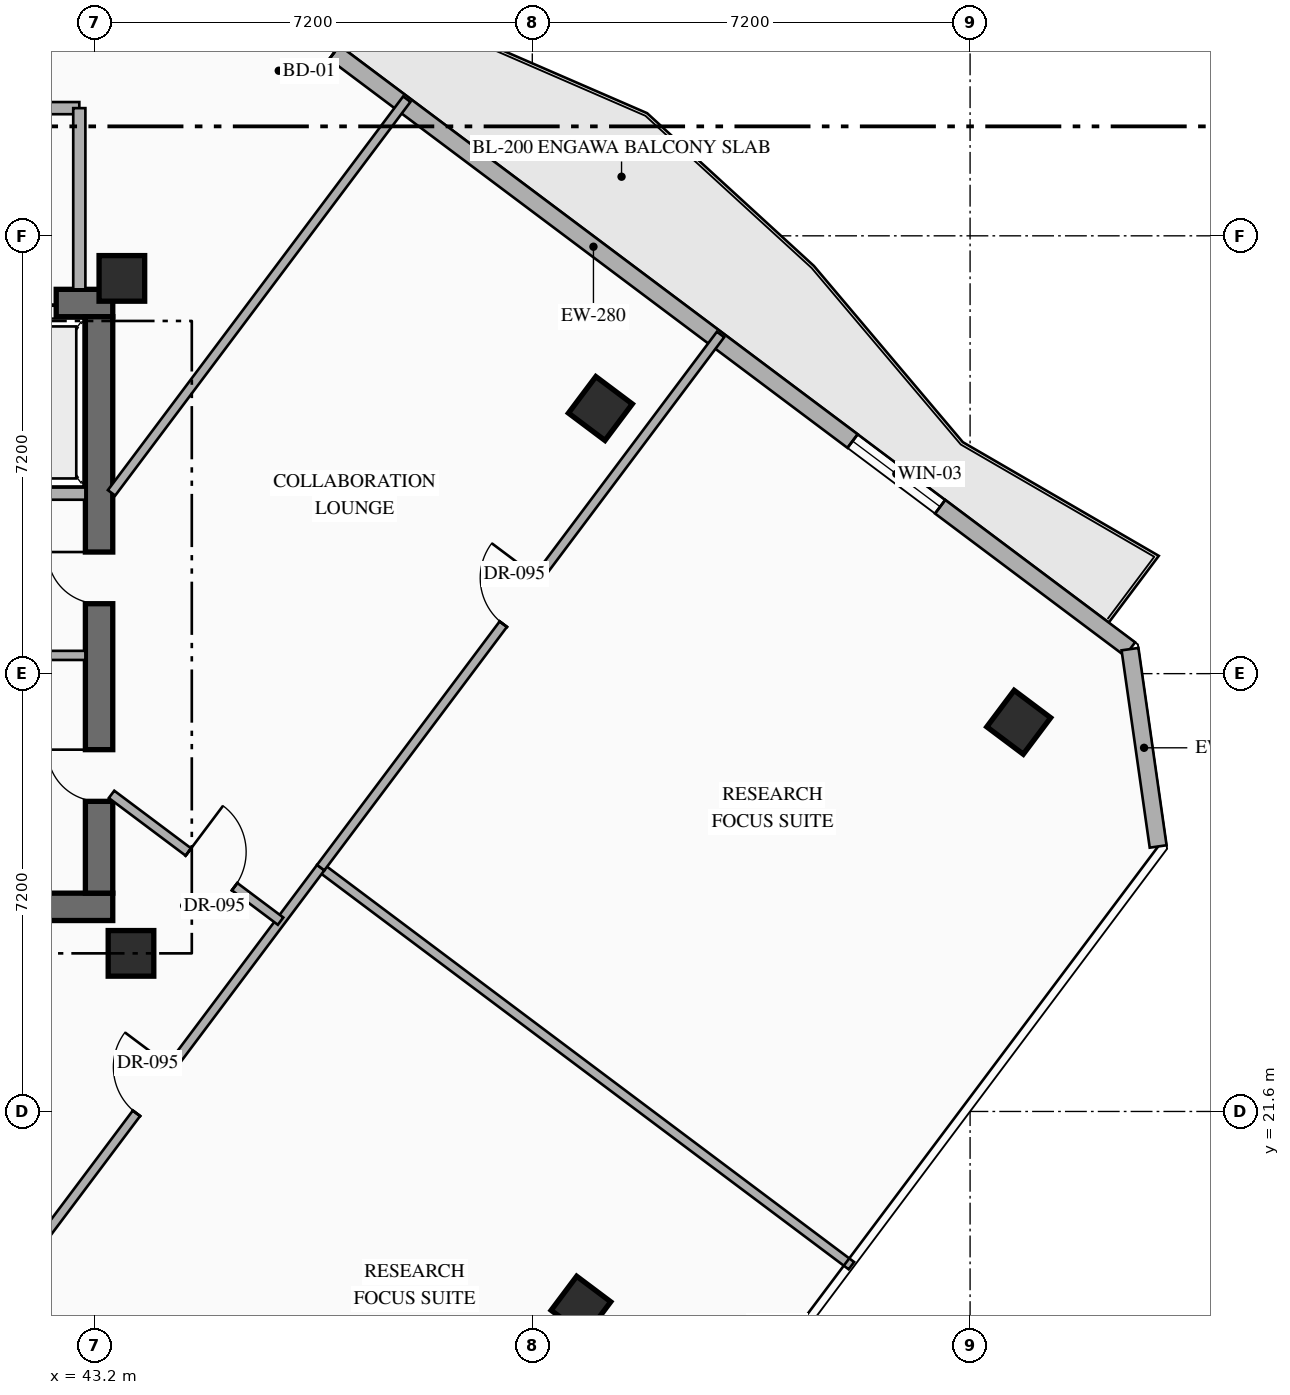
"""IFC4 building model, lengths in metres.
Left out: names, types, materials, properties, quantities, classifications, styles, units other than length and angle.
Written with IfcOpenShell. Run it as: python <this file> out.ifc"""

import sys

from ifc_helpers import new_model, si_unit, direction, frame, frame_2d, origin, origin_2d, place, context, subcontext, project, spatial, rectangle, hollow_rectangle, extrude, element, fill, save


model = new_model("IFC4")
c1 = context("Model", 3, precision=1e-05, world=origin(), true_north=direction((0.0, 1.0)))
c2 = subcontext(c1, "Body", "Model", "MODEL_VIEW")
j1 = project(units=[si_unit("LENGTHUNIT", "METRE"), si_unit("PLANEANGLEUNIT", "RADIAN")], contexts=[c1])
p1 = place(None, origin())
s1 = spatial("IfcSite", under=j1, at=p1, CompositionType="ELEMENT")
p2 = place(p1, origin())
s2 = spatial("IfcBuilding", under=s1, at=p2, CompositionType="ELEMENT")
p3 = place(p2, frame((0.0, 0.0, 186.75)))
s3 = spatial("IfcBuildingStorey", under=s2, at=p3, CompositionType="ELEMENT", Elevation=186.75)
p4 = place(p3, frame((36.04, 24.965, 0.0), z_axis=(0.0, 0.0, 1.0), x_axis=(1.0, 0.0, 0.0)))
e1 = element("IfcWall", 1, at=p4, inside=s3, PredefinedType="SHEAR", context=c2, shape_type="SweptSolid", body=[
    extrude(rectangle(XDim=7.46, YDim=0.45, at=frame_2d((3.73, 0.0))), origin(), (0.0, 0.0, 1.0), 4.8),
])
p5 = place(p3, frame((36.04, 34.895, 0.0), z_axis=(0.0, 0.0, 1.0), x_axis=(1.0, 0.0, 0.0)))
e2 = element("IfcWall", 2, at=p5, inside=s3, PredefinedType="SHEAR", context=c2, shape_type="SweptSolid", body=[
    extrude(rectangle(XDim=7.46, YDim=0.45, at=frame_2d((3.73, 0.0))), origin(), (0.0, 0.0, 1.0), 4.8),
])
p6 = place(p5, frame((2.51, 0.0, 0.0)))
e3 = element("IfcOpeningElement", 3, at=p6, cuts=e2, PredefinedType="OPENING", context=c2, shape_type="SweptSolid", body=[
    extrude(rectangle(XDim=1.1, YDim=2.2, at=frame_2d((0.55, 1.1))), frame((0.0, 0.235, 0.0), z_axis=(0.0, -1.0, 0.0), x_axis=(1.0, 0.0, 0.0)), (0.0, 0.0, 1.0), 0.47),
])
p7 = place(p5, frame((5.41, 0.0, 0.0)))
e4 = element("IfcOpeningElement", 4, at=p7, cuts=e2, PredefinedType="OPENING", context=c2, shape_type="SweptSolid", body=[
    extrude(rectangle(XDim=1.12, YDim=2.15, at=frame_2d((0.56, 1.075))), frame((0.0, 0.235, 0.0), z_axis=(0.0, -1.0, 0.0), x_axis=(1.0, 0.0, 0.0)), (0.0, 0.0, 1.0), 0.47),
])
p8 = place(p3, frame((43.275, 25.19, 0.0), z_axis=(0.0, 0.0, 1.0), x_axis=(0.0, 1.0, 0.0)))
e5 = element("IfcWall", 5, at=p8, inside=s3, PredefinedType="SHEAR", context=c2, shape_type="SweptSolid", body=[
    extrude(rectangle(XDim=9.48, YDim=0.45, at=frame_2d((4.74, 0.0))), origin(), (0.0, 0.0, 1.0), 4.8),
])
p9 = place(p8, frame((1.51, 0.0, 0.0)))
e6 = element("IfcOpeningElement", 6, at=p9, cuts=e5, PredefinedType="OPENING", context=c2, shape_type="SweptSolid", body=[
    extrude(rectangle(XDim=0.85, YDim=2.08, at=frame_2d((0.425, 1.04))), frame((0.0, 0.235, 0.0), z_axis=(0.0, -1.0, 0.0), x_axis=(1.0, 0.0, 0.0)), (0.0, 0.0, 1.0), 0.47),
])
p10 = place(p8, frame((4.76, 0.0, 0.0)))
e7 = element("IfcOpeningElement", 7, at=p10, cuts=e5, PredefinedType="OPENING", context=c2, shape_type="SweptSolid", body=[
    extrude(rectangle(XDim=0.85, YDim=2.08, at=frame_2d((0.425, 1.04))), frame((0.0, 0.235, 0.0), z_axis=(0.0, -1.0, 0.0), x_axis=(1.0, 0.0, 0.0)), (0.0, 0.0, 1.0), 0.47),
])
for number, where, z_axis, x_axis in (
    (8, (43.8, 24.2, 0.0), (0.0, 0.0, 1.0), (1.0, 0.0, 0.0)),
    (9, (43.65, 35.3, 0.0), (0.0, 0.0, 1.0), (1.0, 0.0, 0.0)),
    (10, (51.52, 33.16, 0.0), (0.0, 0.0, 1.0), (0.8, -0.6, 0.0)),
    (11, (58.4, 28.0, 0.0), (0.0, 0.0, 1.0), (0.8, -0.6, 0.0)),
):
    element("IfcColumn", number, at=place(p3, frame(where, z_axis=z_axis, x_axis=x_axis)), inside=s3, PredefinedType="COLUMN", context=c2, shape_type="SweptSolid", body=[
        extrude(hollow_rectangle(XDim=0.75, YDim=0.75, WallThickness=0.028, at=origin_2d()), origin(), (0.0, 0.0, 1.0), 4.8),
    ])
p11 = place(p3, frame((51.2, 18.4, 0.0), z_axis=(0.0, 0.0, 1.0), x_axis=(0.799999996291, -0.600000004945, 0.0)))
e12 = element("IfcColumn", 12, at=p11, inside=s3, PredefinedType="COLUMN", context=c2, shape_type="SweptSolid", body=[
    extrude(hollow_rectangle(XDim=0.7, YDim=0.7, WallThickness=0.028, at=origin_2d()), origin(), (0.0, 0.0, 1.0), 4.8),
])
p12 = place(p3, frame((44.86, 40.73, 0.0), z_axis=(0.0, 0.0, 1.0), x_axis=(0.800007624502, -0.599989833863, 0.0)))
e13 = element("IfcWall", 13, at=p12, inside=s3, PredefinedType="STANDARD", context=c2, shape_type="SweptSolid", body=[
    extrude(rectangle(XDim=19.212, YDim=0.28, at=frame_2d((9.606, 0.0))), origin(), (0.0, 0.0, 1.0), 4.55),
])
p13 = place(p12, frame((1.755, 0.0, 0.0)))
e14 = element("IfcOpeningElement", 14, at=p13, cuts=e13, PredefinedType="OPENING", context=c2, shape_type="SweptSolid", body=[
    extrude(rectangle(XDim=1.1, YDim=2.2, at=frame_2d((0.55, 1.1))), frame((0.0, 0.15, 0.0), z_axis=(0.0, -1.0, 0.0), x_axis=(1.0, 0.0, 0.0)), (0.0, 0.0, 1.0), 0.3),
])
p14 = place(p12, frame((13.509, 0.0, 0.85)))
e15 = element("IfcOpeningElement", 15, at=p14, cuts=e13, PredefinedType="OPENING", context=c2, shape_type="SweptSolid", body=[
    extrude(rectangle(XDim=1.8, YDim=2.1, at=frame_2d((0.9, 1.05))), frame((0.0, 0.15, 0.0), z_axis=(0.0, -1.0, 0.0), x_axis=(1.0, 0.0, 0.0)), (0.0, 0.0, 1.0), 0.3),
])
p15 = place(p3, frame((60.23, 29.203, 0.0), z_axis=(0.0, 0.0, 1.0), x_axis=(0.141296221922, -0.989967361922, 0.0)))
e16 = element("IfcWall", 16, at=p15, inside=s3, PredefinedType="STANDARD", context=c2, shape_type="SweptSolid", body=[
    extrude(rectangle(XDim=3.278, YDim=0.28, at=frame_2d((1.639, 0.0))), origin(), (0.0, 0.0, 1.0), 4.55),
])
p16 = place(p3, frame((40.97, 31.76, 0.0), z_axis=(0.0, 0.0, 1.0), x_axis=(1.0, 0.0, 0.0)))
e17 = element("IfcWall", 17, at=p16, inside=s3, PredefinedType="STANDARD", context=c2, shape_type="SweptSolid", body=[
    extrude(rectangle(XDim=2.08, YDim=0.2, at=frame_2d((1.04, 0.0))), origin(), (0.0, 0.0, 1.0), 4.55),
])
p17 = place(p3, frame((40.97, 29.1, 0.0), z_axis=(0.0, 0.0, 1.0), x_axis=(1.0, 0.0, 0.0)))
e18 = element("IfcWall", 18, at=p17, inside=s3, PredefinedType="PARTITIONING", context=c2, shape_type="SweptSolid", body=[
    extrude(rectangle(XDim=2.08, YDim=0.15, at=frame_2d((1.04, 0.0))), origin(), (0.0, 0.0, 1.0), 4.55),
])
p18 = place(p3, frame((37.65, 38.1, 0.0), z_axis=(0.0, 0.0, 1.0), x_axis=(1.0, 0.0, 0.0)))
e19 = element("IfcWall", 19, at=p18, inside=s3, PredefinedType="STANDARD", context=c2, shape_type="SweptSolid", body=[
    extrude(rectangle(XDim=5.3, YDim=0.2, at=frame_2d((2.65, 0.0))), origin(), (0.0, 0.0, 1.0), 4.55),
])
p19 = place(p3, frame((42.95, 35.12, 0.0), z_axis=(0.0, 0.0, 1.0), x_axis=(0.0, 1.0, 0.0)))
e20 = element("IfcWall", 20, at=p19, inside=s3, PredefinedType="STANDARD", context=c2, shape_type="SweptSolid", body=[
    extrude(rectangle(XDim=2.98, YDim=0.2, at=frame_2d((1.49, 0.0))), origin(), (0.0, 0.0, 1.0), 4.55),
])
for number, where, z_axis, x_axis in (
    (21, (41.43, 18.29, 0.0), (0.0, 0.0, 1.0), (0.8, -0.6, 0.0)),
    (22, (46.92, 25.61, 0.0), (0.0, 0.0, 1.0), (0.8, -0.6, 0.0)),
):
    element("IfcWall", number, at=place(p3, frame(where, z_axis=z_axis, x_axis=x_axis)), inside=s3, PredefinedType="PARTITIONING", context=c2, shape_type="SweptSolid", body=[
        extrude(rectangle(XDim=10.91, YDim=0.15, at=frame_2d((5.455, 0.0))), origin(), (0.0, 0.0, 1.0), 4.55),
    ])
p20 = place(p3, frame((41.43, 18.29, 0.0), z_axis=(0.0, 0.0, 1.0), x_axis=(0.599995730889, 0.800003201816, 0.0)))
e23 = element("IfcWall", 23, at=p20, inside=s3, PredefinedType="PARTITIONING", context=c2, shape_type="SweptSolid", body=[
    extrude(rectangle(XDim=9.15, YDim=0.15, at=frame_2d((4.575, 0.0))), origin(), (0.0, 0.0, 1.0), 4.55),
])
p21 = place(p20, frame((4.1, 0.0, 0.0)))
e24 = element("IfcOpeningElement", 24, at=p21, cuts=e23, PredefinedType="OPENING", context=c2, shape_type="SweptSolid", body=[
    extrude(rectangle(XDim=0.95, YDim=2.15, at=frame_2d((0.475, 1.075))), frame((0.0, 0.085, 0.0), z_axis=(0.0, -1.0, 0.0), x_axis=(1.0, 0.0, 0.0)), (0.0, 0.0, 1.0), 0.17),
])
p22 = place(p3, frame((46.92, 25.61, 0.0), z_axis=(0.0, 0.0, 1.0), x_axis=(0.600017820398, 0.799986634391, 0.0)))
e25 = element("IfcWall", 25, at=p22, inside=s3, PredefinedType="PARTITIONING", context=c2, shape_type="SweptSolid", body=[
    extrude(rectangle(XDim=10.96, YDim=0.15, at=frame_2d((5.48, 0.0))), origin(), (0.0, 0.0, 1.0), 4.55),
])
p23 = place(p22, frame((5.005, 0.0, 0.0)))
e26 = element("IfcOpeningElement", 26, at=p23, cuts=e25, PredefinedType="OPENING", context=c2, shape_type="SweptSolid", body=[
    extrude(rectangle(XDim=0.95, YDim=2.15, at=frame_2d((0.475, 1.075))), frame((0.0, 0.085, 0.0), z_axis=(0.0, -1.0, 0.0), x_axis=(1.0, 0.0, 0.0)), (0.0, 0.0, 1.0), 0.17),
])
p24 = place(p3, frame((43.48, 26.815, 0.0), z_axis=(0.0, 0.0, 1.0), x_axis=(0.800008430676, -0.599988758934, 0.0)))
e27 = element("IfcWall", 27, at=p24, inside=s3, PredefinedType="PARTITIONING", context=c2, shape_type="SweptSolid", body=[
    extrude(rectangle(XDim=3.475, YDim=0.15, at=frame_2d((1.738, 0.0))), origin(), (0.0, 0.0, 1.0), 4.55),
])
p25 = place(p24, frame((1.58, 0.0, 0.0)))
e28 = element("IfcOpeningElement", 28, at=p25, cuts=e27, PredefinedType="OPENING", context=c2, shape_type="SweptSolid", body=[
    extrude(rectangle(XDim=0.95, YDim=2.15, at=frame_2d((0.475, 1.075))), frame((0.0, 0.085, 0.0), z_axis=(0.0, -1.0, 0.0), x_axis=(1.0, 0.0, 0.0)), (0.0, 0.0, 1.0), 0.17),
])
p26 = place(p3, frame((43.48, 31.773, 0.0), z_axis=(0.0, 0.0, 1.0), x_axis=(0.599971041729, 0.800021717885, 0.0)))
e29 = element("IfcWall", 29, at=p26, inside=s3, PredefinedType="PARTITIONING", context=c2, shape_type="SweptSolid", body=[
    extrude(rectangle(XDim=8.094, YDim=0.15, at=frame_2d((4.047, 0.0))), origin(), (0.0, 0.0, 1.0), 4.55),
])
p27 = place(p13, origin())
e30 = element("IfcDoor", 30, at=p27, inside=s3, OperationType="SINGLE_SWING_LEFT", PredefinedType="DOOR", context=c2, shape_type="SweptSolid", body=[
    extrude(rectangle(XDim=1.1, YDim=2.2, at=frame_2d((0.55, 1.1))), frame((0.0, 0.025, 0.0), z_axis=(0.0, -1.0, 0.0), x_axis=(1.0, 0.0, 0.0)), (0.0, 0.0, 1.0), 0.05),
])
fill(e14, e30)
p28 = place(p14, origin())
e31 = element("IfcWindow", 31, at=p28, inside=s3, PartitioningType="SINGLE_PANEL", PredefinedType="WINDOW", context=c2, shape_type="SweptSolid", body=[
    extrude(rectangle(XDim=1.8, YDim=2.1, at=frame_2d((0.9, 1.05))), frame((0.0, 0.03, 0.0), z_axis=(0.0, -1.0, 0.0), x_axis=(1.0, 0.0, 0.0)), (0.0, 0.0, 1.0), 0.06),
])
fill(e15, e31)
p29 = place(p7, origin())
e32 = element("IfcDoor", 32, at=p29, inside=s3, OperationType="SLIDING_TO_RIGHT", PredefinedType="USERDEFINED", context=c2, shape_type="SweptSolid", body=[
    extrude(rectangle(XDim=1.12, YDim=2.15, at=frame_2d((0.56, 1.075))), frame((0.0, 0.025, 0.0), z_axis=(0.0, -1.0, 0.0), x_axis=(1.0, 0.0, 0.0)), (0.0, 0.0, 1.0), 0.05),
])
fill(e4, e32)
p30 = place(p9, origin())
e33 = element("IfcDoor", 33, at=p30, inside=s3, OperationType="SINGLE_SWING_RIGHT", PredefinedType="DOOR", context=c2, shape_type="SweptSolid", body=[
    extrude(rectangle(XDim=0.85, YDim=2.08, at=frame_2d((0.425, 1.04))), frame((0.0, 0.025, 0.0), z_axis=(0.0, -1.0, 0.0), x_axis=(1.0, 0.0, 0.0)), (0.0, 0.0, 1.0), 0.05),
])
fill(e6, e33)
p31 = place(p10, origin())
e34 = element("IfcDoor", 34, at=p31, inside=s3, OperationType="SINGLE_SWING_RIGHT", PredefinedType="DOOR", context=c2, shape_type="SweptSolid", body=[
    extrude(rectangle(XDim=0.85, YDim=2.08, at=frame_2d((0.425, 1.04))), frame((0.0, 0.025, 0.0), z_axis=(0.0, -1.0, 0.0), x_axis=(1.0, 0.0, 0.0)), (0.0, 0.0, 1.0), 0.05),
])
fill(e7, e34)
p32 = place(p21, origin())
e35 = element("IfcDoor", 35, at=p32, inside=s3, OperationType="SINGLE_SWING_RIGHT", PredefinedType="DOOR", context=c2, shape_type="SweptSolid", body=[
    extrude(rectangle(XDim=0.95, YDim=2.15, at=frame_2d((0.475, 1.075))), frame((0.0, 0.025, 0.0), z_axis=(0.0, -1.0, 0.0), x_axis=(1.0, 0.0, 0.0)), (0.0, 0.0, 1.0), 0.05),
])
fill(e24, e35)
p33 = place(p23, origin())
e36 = element("IfcDoor", 36, at=p33, inside=s3, OperationType="SINGLE_SWING_RIGHT", PredefinedType="DOOR", context=c2, shape_type="SweptSolid", body=[
    extrude(rectangle(XDim=0.95, YDim=2.15, at=frame_2d((0.475, 1.075))), frame((0.0, 0.025, 0.0), z_axis=(0.0, -1.0, 0.0), x_axis=(1.0, 0.0, 0.0)), (0.0, 0.0, 1.0), 0.05),
])
fill(e26, e36)
p34 = place(p25, origin())
e37 = element("IfcDoor", 37, at=p34, inside=s3, OperationType="SINGLE_SWING_LEFT", PredefinedType="DOOR", context=c2, shape_type="SweptSolid", body=[
    extrude(rectangle(XDim=0.95, YDim=2.15, at=frame_2d((0.475, 1.075))), frame((0.0, 0.025, 0.0), z_axis=(0.0, -1.0, 0.0), x_axis=(1.0, 0.0, 0.0)), (0.0, 0.0, 1.0), 0.05),
])
fill(e28, e37)
save(model, sys.argv[1])
